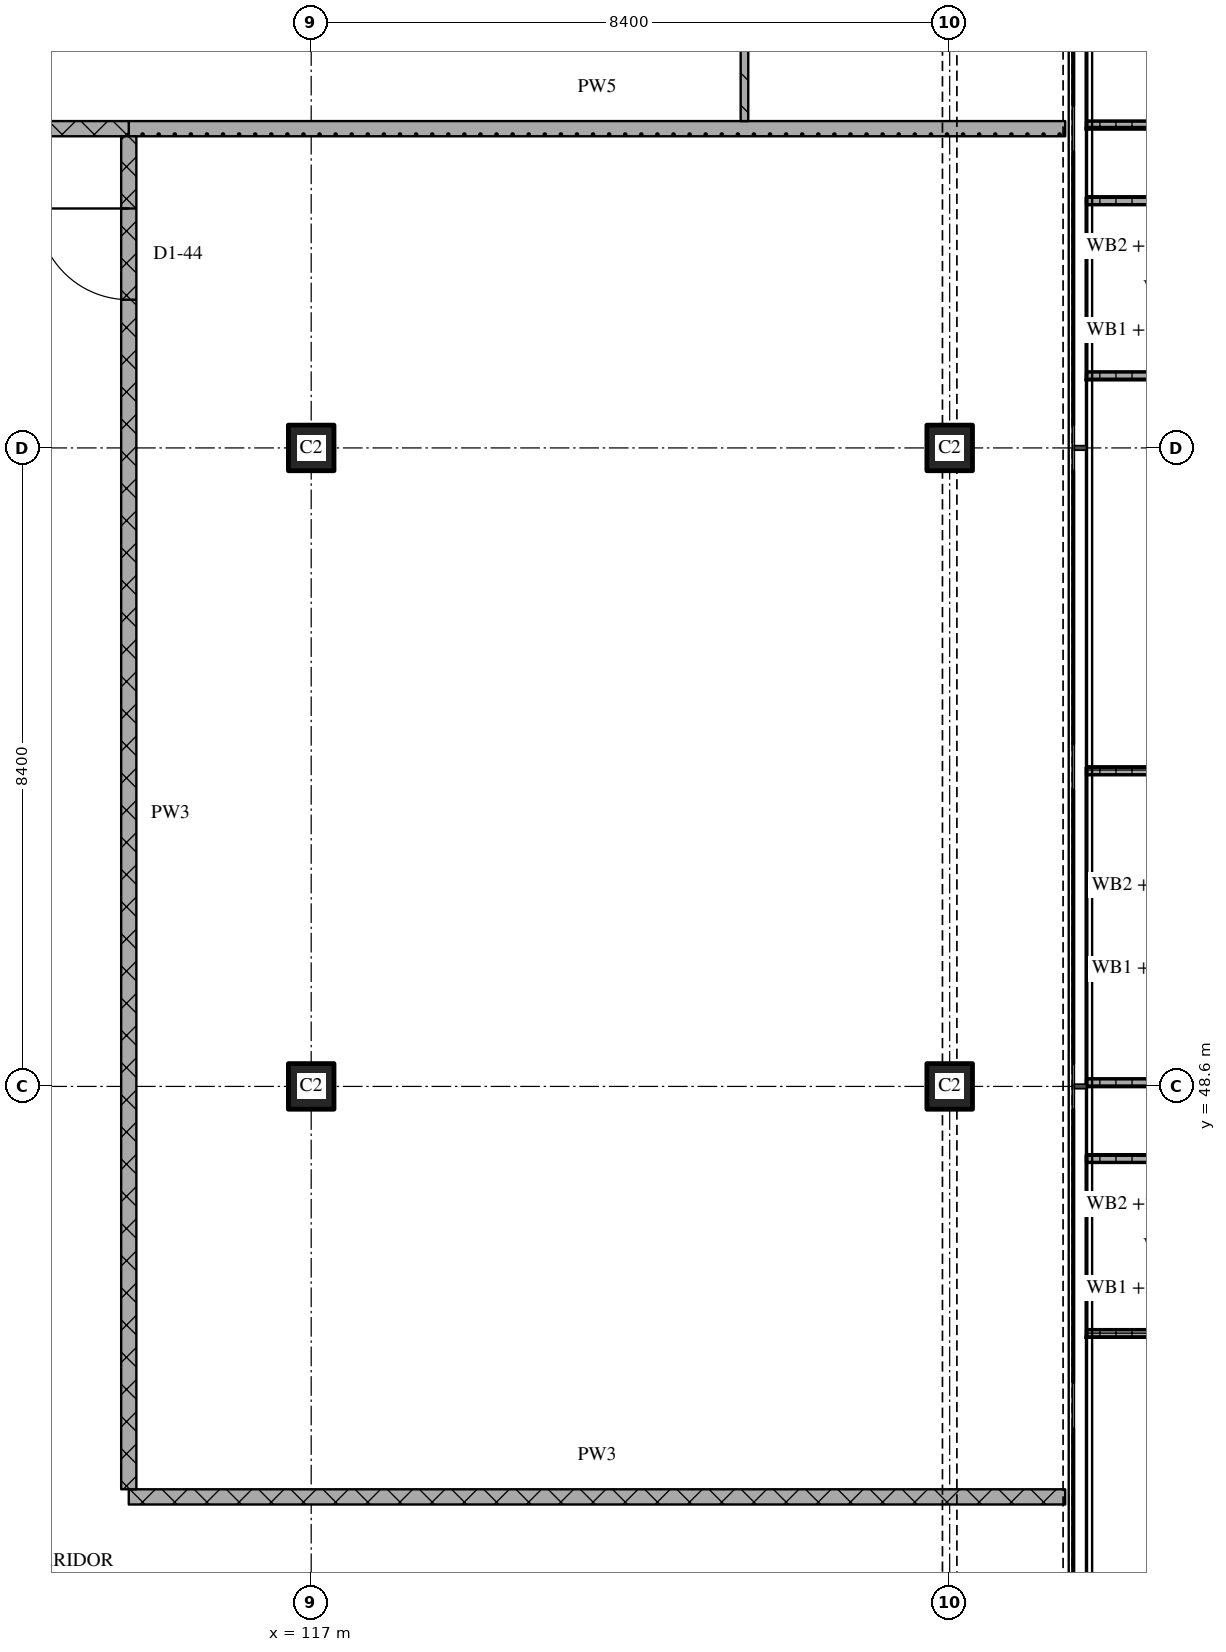
"""IFC4 building model, lengths in metres.
Left out: names, types, materials, properties, quantities, classifications, styles, units other than length and angle.
Written with IfcOpenShell. Run it as: python <this file> out.ifc"""

import sys

from ifc_helpers import new_model, si_unit, direction, frame, frame_2d, origin, origin_2d, place, context, subcontext, project, spatial, polyline, rectangle, outline, extrude, element, fill, save


model = new_model("IFC4")
c1 = context("Model", 3, precision=1e-05, world=origin(), true_north=direction((0.0, 1.0)))
c2 = subcontext(c1, "Body", "Model", "MODEL_VIEW")
j1 = project(units=[si_unit("LENGTHUNIT", "METRE"), si_unit("PLANEANGLEUNIT", "RADIAN")], contexts=[c1])
p1 = place(None, origin())
s1 = spatial("IfcSite", under=j1, at=p1, CompositionType="ELEMENT")
p2 = place(p1, origin())
s2 = spatial("IfcBuilding", under=s1, at=p2, CompositionType="ELEMENT")
p3 = place(p2, frame((0.0, 0.0, 212.7)))
s3 = spatial("IfcBuildingStorey", under=s2, at=p3, CompositionType="ELEMENT", Elevation=212.7)
for number, where, z_axis, x_axis in (
    (1, (117.0, 48.6, 0.0), (0.0, 0.0, 1.0), (1.0, 0.0, 0.0)),
    (2, (117.0, 57.0, 0.0), (0.0, 0.0, 1.0), (1.0, 0.0, 0.0)),
    (3, (125.4, 48.6, 0.0), (0.0, 0.0, 1.0), (1.0, 0.0, 0.0)),
    (4, (125.4, 57.0, 0.0), (0.0, 0.0, 1.0), (1.0, 0.0, 0.0)),
):
    element("IfcColumn", number, at=place(p3, frame(where, z_axis=z_axis, x_axis=x_axis)), inside=s3, PredefinedType="COLUMN", context=c2, shape_type="SweptSolid", body=[
        extrude(rectangle(XDim=0.6, YDim=0.6, at=origin_2d()), origin(), (0.0, 0.0, 1.0), 3.6),
    ])
p4 = place(p3, origin())
e5 = element("IfcWall", 5, at=p4, inside=s3, PredefinedType="SOLIDWALL", context=c2, shape_type="SweptSolid", body=[
    extrude(outline(polyline([(127.2, 45.3), (127.2, 45.4), (128.7, 45.4), (128.7, 47.6), (127.2, 47.6), (127.2, 47.7), (128.8, 47.7), (128.8, 45.3), (127.2, 45.3)])), origin(), (0.0, 0.0, 1.0), 1.0),
])
p5 = place(p3, origin())
e6 = element("IfcWall", 6, at=p5, inside=s3, PredefinedType="SOLIDWALL", context=c2, shape_type="SweptSolid", body=[
    extrude(outline(polyline([(127.2, 48.6), (127.2, 48.7), (128.833, 48.7), (128.833, 52.7), (127.2, 52.7), (127.2, 52.8), (128.933, 52.8), (128.933, 48.6), (127.2, 48.6)])), origin(), (0.0, 0.0, 1.0), 1.0),
])
p6 = place(p3, origin())
e7 = element("IfcWall", 7, at=p6, inside=s3, PredefinedType="SOLIDWALL", context=c2, shape_type="SweptSolid", body=[
    extrude(outline(polyline([(127.2, 57.9), (127.2, 58.0), (128.7, 58.0), (128.7, 60.2), (127.2, 60.2), (127.2, 60.3), (128.8, 60.3), (128.8, 57.9), (127.2, 57.9)])), origin(), (0.0, 0.0, 1.0), 1.0),
])
p7 = place(p3, origin())
e8 = element("IfcWall", 8, at=p7, inside=s3, PredefinedType="SOLIDWALL", context=c2, shape_type="SweptSolid", body=[
    extrude(outline(polyline([(127.2, 61.2), (127.2, 61.3), (128.833, 61.3), (128.833, 65.3), (127.2, 65.3), (127.2, 65.4), (128.933, 65.4), (128.933, 61.2), (127.2, 61.2)])), origin(), (0.0, 0.0, 1.0), 1.0),
])
p8 = place(p3, frame((114.6, 43.2, 0.0), z_axis=(0.0, 0.0, 1.0), x_axis=(1.0, 0.0, 0.0)))
e9 = element("IfcWall", 9, at=p8, inside=s3, PredefinedType="PARTITIONING", context=c2, shape_type="SweptSolid", body=[
    extrude(rectangle(XDim=12.32, YDim=0.2, at=frame_2d((6.16, 0.0))), origin(), (0.0, 0.0, 1.0), 3.32),
])
p9 = place(p3, frame((111.0, 61.2, 0.0), z_axis=(0.0, 0.0, 1.0), x_axis=(1.0, 0.0, 0.0)))
e10 = element("IfcWall", 10, at=p9, inside=s3, PredefinedType="PARTITIONING", context=c2, shape_type="SweptSolid", body=[
    extrude(rectangle(XDim=3.6, YDim=0.2, at=frame_2d((1.8, 0.0))), origin(), (0.0, 0.0, 1.0), 3.32),
])
p10 = place(p3, frame((114.6, 61.2, 0.0), z_axis=(0.0, 0.0, 1.0), x_axis=(1.0, 0.0, 0.0)))
e11 = element("IfcWall", 11, at=p10, inside=s3, PredefinedType="PARTITIONING", context=c2, shape_type="SweptSolid", body=[
    extrude(rectangle(XDim=12.32, YDim=0.2, at=frame_2d((6.16, 0.0))), origin(), (0.0, 0.0, 1.0), 3.32),
])
p11 = place(p3, frame((114.6, 61.1, 0.0), z_axis=(0.0, 0.0, 1.0), x_axis=(0.0, -1.0, 0.0)))
e12 = element("IfcWall", 12, at=p11, inside=s3, PredefinedType="PARTITIONING", context=c2, shape_type="SweptSolid", body=[
    extrude(rectangle(XDim=17.8, YDim=0.2, at=frame_2d((8.9, 0.0))), origin(), (0.0, 0.0, 1.0), 3.32),
])
p12 = place(p11, frame((0.95, 0.0, 0.0)))
e13 = element("IfcOpeningElement", 13, at=p12, cuts=e12, PredefinedType="OPENING", context=c2, shape_type="SweptSolid", body=[
    extrude(rectangle(XDim=1.2, YDim=2.1, at=frame_2d((0.6, 1.05))), frame((0.0, 0.11, 0.0), z_axis=(0.0, -1.0, 0.0), x_axis=(1.0, 0.0, 0.0)), (0.0, 0.0, 1.0), 0.22),
])
p13 = place(p3, frame((122.7, 69.55, 0.0), z_axis=(0.0, 0.0, 1.0), x_axis=(0.0, -1.0, 0.0)))
e14 = element("IfcWall", 14, at=p13, inside=s3, PredefinedType="PARTITIONING", context=c2, shape_type="SweptSolid", body=[
    extrude(rectangle(XDim=8.25, YDim=0.1, at=frame_2d((4.125, 0.0))), origin(), (0.0, 0.0, 1.0), 3.32),
])
p14 = place(p12, origin())
e15 = element("IfcDoor", 15, at=p14, inside=s3, OperationType="SINGLE_SWING_RIGHT", PredefinedType="DOOR", context=c2, shape_type="SweptSolid", body=[
    extrude(rectangle(XDim=1.2, YDim=2.1, at=frame_2d((0.6, 1.05))), frame((0.0, 0.025, 0.0), z_axis=(0.0, -1.0, 0.0), x_axis=(1.0, 0.0, 0.0)), (0.0, 0.0, 1.0), 0.05),
])
fill(e13, e15)
save(model, sys.argv[1])
